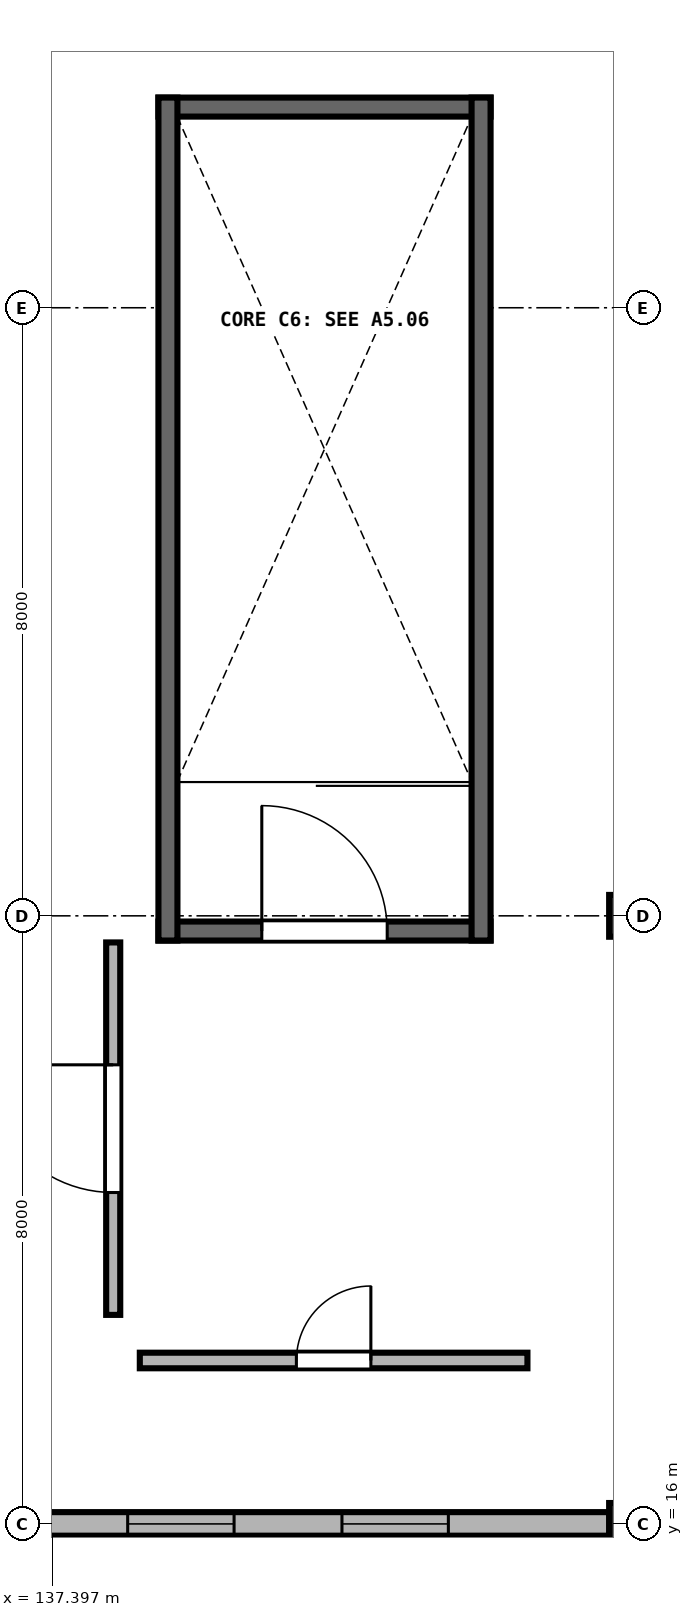
"""IFC4 building model, lengths in metres.
Left out: names, types, materials, properties, quantities, classifications, styles, units other than length and angle.
Written with IfcOpenShell. Run it as: python <this file> out.ifc"""

import sys

from ifc_helpers import new_model, si_unit, direction, frame, frame_2d, origin, origin_2d, place, context, subcontext, project, spatial, rectangle, extrude, element, fill, save


model = new_model("IFC4")
c1 = context("Model", 3, precision=1e-05, world=origin(), true_north=direction((0.0, 1.0)))
c2 = subcontext(c1, "Body", "Model", "MODEL_VIEW")
j1 = project(units=[si_unit("LENGTHUNIT", "METRE"), si_unit("PLANEANGLEUNIT", "RADIAN")], contexts=[c1])
p1 = place(None, origin())
s1 = spatial("IfcSite", under=j1, at=p1, CompositionType="ELEMENT")
p2 = place(p1, origin())
s2 = spatial("IfcBuilding", under=s1, at=p2, CompositionType="ELEMENT")
p3 = place(p2, frame((0.0, 0.0, 19.2)))
s3 = spatial("IfcBuildingStorey", under=s2, at=p3, CompositionType="ELEMENT", Elevation=19.2)
for number, where, z_axis, x_axis in (
    (1, (145.0, 16.0, 0.0), (0.0, 0.0, 1.0), (1.0, 0.0, 0.0)),
    (2, (145.0, 24.0, 0.0), (0.0, 0.0, 1.0), (1.0, 0.0, 0.0)),
):
    element("IfcColumn", number, at=place(p3, frame(where, z_axis=z_axis, x_axis=x_axis)), inside=s3, PredefinedType="COLUMN", context=c2, shape_type="SweptSolid", body=[
        extrude(rectangle(XDim=0.55, YDim=0.55, at=origin_2d()), origin(), (0.0, 0.0, 1.0), 4.25),
    ])
p4 = place(p3, frame((136.271, 16.0, 0.0), z_axis=(0.0, 0.0, 1.0), x_axis=(1.0, 0.0, 0.0)))
e3 = element("IfcWall", 3, at=p4, inside=s3, PredefinedType="SOLIDWALL", context=c2, shape_type="SweptSolid", body=[
    extrude(rectangle(XDim=8.458, YDim=0.31, at=frame_2d((4.229, 0.0))), origin(), (0.0, 0.0, 1.0), 3.79),
])
p5 = place(p4, frame((2.119, 0.0, 0.75)))
e4 = element("IfcOpeningElement", 4, at=p5, cuts=e3, PredefinedType="OPENING", context=c2, shape_type="SweptSolid", body=[
    extrude(rectangle(XDim=1.4, YDim=1.65, at=frame_2d((0.7, 0.825))), frame((0.0, 0.165, 0.0), z_axis=(0.0, -1.0, 0.0), x_axis=(1.0, 0.0, 0.0)), (0.0, 0.0, 1.0), 0.33),
])
p6 = place(p4, frame((4.939, 0.0, 0.75)))
e5 = element("IfcOpeningElement", 5, at=p6, cuts=e3, PredefinedType="OPENING", context=c2, shape_type="SweptSolid", body=[
    extrude(rectangle(XDim=1.4, YDim=1.65, at=frame_2d((0.7, 0.825))), frame((0.0, 0.165, 0.0), z_axis=(0.0, -1.0, 0.0), x_axis=(1.0, 0.0, 0.0)), (0.0, 0.0, 1.0), 0.33),
])
p7 = place(p3, frame((138.795, 23.8, 0.0), z_axis=(0.0, 0.0, 1.0), x_axis=(1.0, 0.0, 0.0)))
e6 = element("IfcWall", 6, at=p7, inside=s3, PredefinedType="SHEAR", context=c2, shape_type="SweptSolid", body=[
    extrude(rectangle(XDim=4.37, YDim=0.25, at=frame_2d((2.185, 0.0))), origin(), (0.0, 0.0, 1.0), 4.25),
])
p8 = place(p7, frame((1.36, 0.0, 0.0)))
e7 = element("IfcOpeningElement", 7, at=p8, cuts=e6, PredefinedType="OPENING", context=c2, shape_type="SweptSolid", body=[
    extrude(rectangle(XDim=1.65, YDim=2.22, at=frame_2d((0.825, 1.11))), frame((0.0, 0.135, 0.0), z_axis=(0.0, -1.0, 0.0), x_axis=(1.0, 0.0, 0.0)), (0.0, 0.0, 1.0), 0.27),
])
p9 = place(p3, frame((138.795, 34.64, 0.0), z_axis=(0.0, 0.0, 1.0), x_axis=(1.0, 0.0, 0.0)))
e8 = element("IfcWall", 8, at=p9, inside=s3, PredefinedType="SHEAR", context=c2, shape_type="SweptSolid", body=[
    extrude(rectangle(XDim=4.37, YDim=0.25, at=frame_2d((2.185, 0.0))), origin(), (0.0, 0.0, 1.0), 4.25),
])
for number, where, z_axis, x_axis in (
    (9, (138.92, 23.675, 0.0), (0.0, 0.0, 1.0), (0.0, 1.0, 0.0)),
    (10, (143.04, 23.675, 0.0), (0.0, 0.0, 1.0), (0.0, 1.0, 0.0)),
):
    element("IfcWall", number, at=place(p3, frame(where, z_axis=z_axis, x_axis=x_axis)), inside=s3, PredefinedType="SHEAR", context=c2, shape_type="SweptSolid", body=[
        extrude(rectangle(XDim=11.09, YDim=0.25, at=frame_2d((5.545, 0.0))), origin(), (0.0, 0.0, 1.0), 4.25),
    ])
p10 = place(p3, frame((138.2, 18.75, 0.0), z_axis=(0.0, 0.0, 1.0), x_axis=(0.0, 1.0, 0.0)))
e11 = element("IfcWall", 11, at=p10, inside=s3, PredefinedType="PARTITIONING", context=c2, shape_type="SweptSolid", body=[
    extrude(rectangle(XDim=4.9, YDim=0.185, at=frame_2d((2.45, 0.0))), origin(), (0.0, 0.0, 1.0), 4.2),
])
p11 = place(p10, frame((1.61, 0.0, 0.0)))
e12 = element("IfcOpeningElement", 12, at=p11, cuts=e11, PredefinedType="OPENING", context=c2, shape_type="SweptSolid", body=[
    extrude(rectangle(XDim=1.68, YDim=2.25, at=frame_2d((0.84, 1.125))), frame((0.0, 0.103, 0.0), z_axis=(0.0, -1.0, 0.0), x_axis=(1.0, 0.0, 0.0)), (0.0, 0.0, 1.0), 0.205),
])
p12 = place(p3, frame((138.55, 18.15, 0.0), z_axis=(0.0, 0.0, 1.0), x_axis=(1.0, 0.0, 0.0)))
e13 = element("IfcWall", 13, at=p12, inside=s3, PredefinedType="PLUMBINGWALL", context=c2, shape_type="SweptSolid", body=[
    extrude(rectangle(XDim=5.1, YDim=0.205, at=frame_2d((2.55, 0.0))), origin(), (0.0, 0.0, 1.0), 4.2),
])
p13 = place(p12, frame((2.06, 0.0, 0.0)))
e14 = element("IfcOpeningElement", 14, at=p13, cuts=e13, PredefinedType="OPENING", context=c2, shape_type="SweptSolid", body=[
    extrude(rectangle(XDim=0.98, YDim=2.14, at=frame_2d((0.49, 1.07))), frame((0.0, 0.113, 0.0), z_axis=(0.0, -1.0, 0.0), x_axis=(1.0, 0.0, 0.0)), (0.0, 0.0, 1.0), 0.225),
])
p14 = place(p5, origin())
e15 = element("IfcWindow", 15, at=p14, inside=s3, PartitioningType="SINGLE_PANEL", PredefinedType="WINDOW", context=c2, shape_type="SweptSolid", body=[
    extrude(rectangle(XDim=1.4, YDim=1.65, at=frame_2d((0.7, 0.825))), frame((0.0, 0.03, 0.0), z_axis=(0.0, -1.0, 0.0), x_axis=(1.0, 0.0, 0.0)), (0.0, 0.0, 1.0), 0.06),
])
fill(e4, e15)
p15 = place(p6, origin())
e16 = element("IfcWindow", 16, at=p15, inside=s3, PartitioningType="SINGLE_PANEL", PredefinedType="WINDOW", context=c2, shape_type="SweptSolid", body=[
    extrude(rectangle(XDim=1.4, YDim=1.65, at=frame_2d((0.7, 0.825))), frame((0.0, 0.03, 0.0), z_axis=(0.0, -1.0, 0.0), x_axis=(1.0, 0.0, 0.0)), (0.0, 0.0, 1.0), 0.06),
])
fill(e5, e16)
p16 = place(p8, origin())
e17 = element("IfcDoor", 17, at=p16, inside=s3, OperationType="SINGLE_SWING_LEFT", PredefinedType="DOOR", context=c2, shape_type="SweptSolid", body=[
    extrude(rectangle(XDim=1.65, YDim=2.22, at=frame_2d((0.825, 1.11))), frame((0.0, 0.025, 0.0), z_axis=(0.0, -1.0, 0.0), x_axis=(1.0, 0.0, 0.0)), (0.0, 0.0, 1.0), 0.05),
])
fill(e7, e17)
p17 = place(p11, origin())
e18 = element("IfcDoor", 18, at=p17, inside=s3, OperationType="SINGLE_SWING_RIGHT", PredefinedType="DOOR", context=c2, shape_type="SweptSolid", body=[
    extrude(rectangle(XDim=1.68, YDim=2.25, at=frame_2d((0.84, 1.125))), frame((0.0, 0.025, 0.0), z_axis=(0.0, -1.0, 0.0), x_axis=(1.0, 0.0, 0.0)), (0.0, 0.0, 1.0), 0.05),
])
fill(e12, e18)
p18 = place(p13, origin())
e19 = element("IfcDoor", 19, at=p18, inside=s3, OperationType="SINGLE_SWING_RIGHT", PredefinedType="DOOR", context=c2, shape_type="SweptSolid", body=[
    extrude(rectangle(XDim=0.98, YDim=2.14, at=frame_2d((0.49, 1.07))), frame((0.0, 0.025, 0.0), z_axis=(0.0, -1.0, 0.0), x_axis=(1.0, 0.0, 0.0)), (0.0, 0.0, 1.0), 0.05),
])
fill(e14, e19)
save(model, sys.argv[1])
